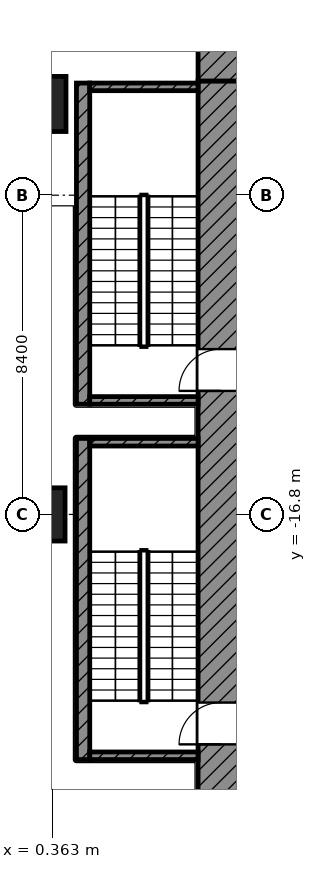
"""IFC4 building model, lengths in metres.
Left out: names, types, materials, properties, quantities, classifications, styles, units other than length and angle.
Written with IfcOpenShell. Run it as: python <this file> out.ifc"""

import sys

from ifc_helpers import new_model, si_unit, direction, frame, frame_2d, origin, origin_2d, place, context, subcontext, project, spatial, rectangle, extrude, element, fill, save


model = new_model("IFC4")
c1 = context("Model", 3, precision=1e-05, world=origin(), true_north=direction((0.0, 1.0)))
c2 = subcontext(c1, "Body", "Model", "MODEL_VIEW")
j1 = project(units=[si_unit("LENGTHUNIT", "METRE"), si_unit("PLANEANGLEUNIT", "RADIAN")], contexts=[c1])
p1 = place(None, origin())
s1 = spatial("IfcSite", under=j1, at=p1, CompositionType="ELEMENT")
p2 = place(p1, origin())
s2 = spatial("IfcBuilding", under=s1, at=p2, CompositionType="ELEMENT")
p3 = place(p2, frame((0.0, 0.0, 23.8)))
s3 = spatial("IfcBuildingStorey", under=s2, at=p3, CompositionType="ELEMENT", Elevation=23.8)
p4 = place(p3, frame((0.0, -6.0, 0.0), z_axis=(0.0, 0.0, 1.0), x_axis=(1.0, 0.0, 0.0)))
e1 = element("IfcColumn", 1, at=p4, inside=s3, PredefinedType="COLUMN", context=c2, shape_type="SweptSolid", body=[
    extrude(rectangle(XDim=1.45, YDim=1.45, at=origin_2d()), origin(), (0.0, 0.0, 1.0), 5.2),
])
p5 = place(p3, frame((0.0, -16.8, 0.0), z_axis=(0.0, 0.0, 1.0), x_axis=(1.0, 0.0, 0.0)))
e2 = element("IfcColumn", 2, at=p5, inside=s3, PredefinedType="COLUMN", context=c2, shape_type="SweptSolid", body=[
    extrude(rectangle(XDim=1.4, YDim=1.4, at=origin_2d()), origin(), (0.0, 0.0, 1.0), 5.2),
])
p6 = place(p3, frame((4.2, -4.8, 0.0), z_axis=(0.0, 0.0, 1.0), x_axis=(1.0, 0.0, 0.0)))
e3 = element("IfcWall", 3, at=p6, inside=s3, PredefinedType="SHEAR", context=c2, shape_type="SweptSolid", body=[
    extrude(rectangle(XDim=21.0, YDim=1.2, at=frame_2d((10.5, 0.0))), origin(), (0.0, 0.0, 1.0), 4.85),
])
p7 = place(p6, frame((1.95, 0.0, 0.0)))
e4 = element("IfcOpeningElement", 4, at=p7, cuts=e3, PredefinedType="OPENING", context=c2, shape_type="SweptSolid", body=[
    extrude(rectangle(XDim=1.1, YDim=2.1, at=frame_2d((0.55, 1.05))), frame((0.0, 0.61, 0.0), z_axis=(0.0, -1.0, 0.0), x_axis=(1.0, 0.0, 0.0)), (0.0, 0.0, 1.0), 1.22),
])
p8 = place(p6, frame((17.95, 0.0, 0.0)))
e5 = element("IfcOpeningElement", 5, at=p8, cuts=e3, PredefinedType="OPENING", context=c2, shape_type="SweptSolid", body=[
    extrude(rectangle(XDim=1.1, YDim=2.1, at=frame_2d((0.55, 1.05))), frame((0.0, 0.61, 0.0), z_axis=(0.0, -1.0, 0.0), x_axis=(1.0, 0.0, 0.0)), (0.0, 0.0, 1.0), 1.22),
])
p9 = place(p3, frame((4.8, -25.2, 0.0), z_axis=(0.0, 0.0, 1.0), x_axis=(0.0, 1.0, 0.0)))
e6 = element("IfcWall", 6, at=p9, inside=s3, PredefinedType="SHEAR", context=c2, shape_type="SweptSolid", body=[
    extrude(rectangle(XDim=19.8, YDim=1.2, at=frame_2d((9.9, 0.0))), origin(), (0.0, 0.0, 1.0), 4.85),
])
p10 = place(p9, frame((11.65, 0.0, 0.0)))
e7 = element("IfcOpeningElement", 7, at=p10, cuts=e6, PredefinedType="OPENING", context=c2, shape_type="SweptSolid", body=[
    extrude(rectangle(XDim=1.1, YDim=2.1, at=frame_2d((0.55, 1.05))), frame((0.0, 0.61, 0.0), z_axis=(0.0, -1.0, 0.0), x_axis=(1.0, 0.0, 0.0)), (0.0, 0.0, 1.0), 1.22),
])
p11 = place(p9, frame((2.35, 0.0, 0.0)))
e8 = element("IfcOpeningElement", 8, at=p11, cuts=e6, PredefinedType="OPENING", context=c2, shape_type="SweptSolid", body=[
    extrude(rectangle(XDim=1.1, YDim=2.1, at=frame_2d((0.55, 1.05))), frame((0.0, 0.61, 0.0), z_axis=(0.0, -1.0, 0.0), x_axis=(1.0, 0.0, 0.0)), (0.0, 0.0, 1.0), 1.22),
])
p12 = place(p3, frame((1.175, -13.9, 0.0), z_axis=(0.0, 0.0, 1.0), x_axis=(0.0, 1.0, 0.0)))
e9 = element("IfcWall", 9, at=p12, inside=s3, PredefinedType="SHEAR", context=c2, shape_type="SweptSolid", body=[
    extrude(rectangle(XDim=8.45, YDim=0.35, at=frame_2d((4.225, 0.0))), origin(), (0.0, 0.0, 1.0), 4.85),
])
for number, where, z_axis, x_axis in (
    (10, (1.35, -5.55, 0.0), (0.0, 0.0, 1.0), (1.0, 0.0, 0.0)),
    (11, (1.35, -13.8, 0.0), (0.0, 0.0, 1.0), (1.0, 0.0, 0.0)),
):
    element("IfcWall", number, at=place(p3, frame(where, z_axis=z_axis, x_axis=x_axis)), inside=s3, PredefinedType="SHEAR", context=c2, shape_type="SweptSolid", body=[
        extrude(rectangle(XDim=2.85, YDim=0.2, at=frame_2d((1.425, 0.0))), origin(), (0.0, 0.0, 1.0), 4.85),
    ])
p13 = place(p3, frame((1.175, -23.25, 0.0), z_axis=(0.0, 0.0, 1.0), x_axis=(0.0, 1.0, 0.0)))
e12 = element("IfcWall", 12, at=p13, inside=s3, PredefinedType="SHEAR", context=c2, shape_type="SweptSolid", body=[
    extrude(rectangle(XDim=8.45, YDim=0.35, at=frame_2d((4.225, 0.0))), origin(), (0.0, 0.0, 1.0), 4.85),
])
for number, where, z_axis, x_axis in (
    (13, (1.35, -14.9, 0.0), (0.0, 0.0, 1.0), (1.0, 0.0, 0.0)),
    (14, (1.35, -23.15, 0.0), (0.0, 0.0, 1.0), (1.0, 0.0, 0.0)),
):
    element("IfcWall", number, at=place(p3, frame(where, z_axis=z_axis, x_axis=x_axis)), inside=s3, PredefinedType="SHEAR", context=c2, shape_type="SweptSolid", body=[
        extrude(rectangle(XDim=2.85, YDim=0.2, at=frame_2d((1.425, 0.0))), origin(), (0.0, 0.0, 1.0), 4.85),
    ])
p14 = place(p10, origin())
e15 = element("IfcDoor", 15, at=p14, inside=s3, OperationType="SINGLE_SWING_LEFT", PredefinedType="DOOR", context=c2, shape_type="SweptSolid", body=[
    extrude(rectangle(XDim=1.1, YDim=2.1, at=frame_2d((0.55, 1.05))), frame((0.0, 0.025, 0.0), z_axis=(0.0, -1.0, 0.0), x_axis=(1.0, 0.0, 0.0)), (0.0, 0.0, 1.0), 0.05),
])
fill(e7, e15)
p15 = place(p11, origin())
e16 = element("IfcDoor", 16, at=p15, inside=s3, OperationType="SINGLE_SWING_LEFT", PredefinedType="DOOR", context=c2, shape_type="SweptSolid", body=[
    extrude(rectangle(XDim=1.1, YDim=2.1, at=frame_2d((0.55, 1.05))), frame((0.0, 0.025, 0.0), z_axis=(0.0, -1.0, 0.0), x_axis=(1.0, 0.0, 0.0)), (0.0, 0.0, 1.0), 0.05),
])
fill(e8, e16)
save(model, sys.argv[1])
